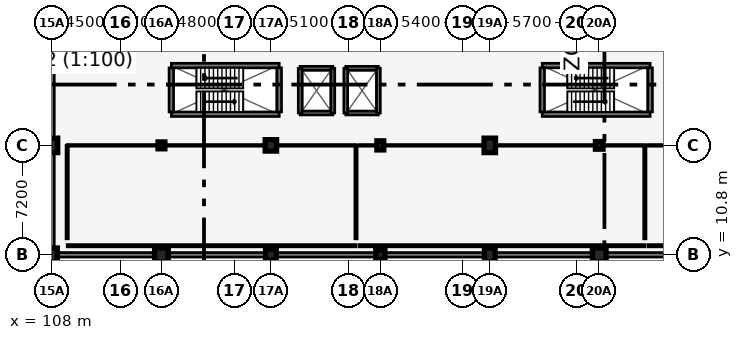
"""IFC4 building model, lengths in metres.
Left out: names, types, materials, properties, quantities, classifications, styles, units other than length and angle.
Written with IfcOpenShell. Run it as: python <this file> out.ifc"""

import sys

from ifc_helpers import new_model, si_unit, direction, frame, frame_2d, origin, origin_2d, place, context, subcontext, project, spatial, rectangle, circle, extrude, element, fill, save


model = new_model("IFC4")
c1 = context("Model", 3, precision=1e-05, world=origin(), true_north=direction((0.0, 1.0)))
c2 = subcontext(c1, "Body", "Model", "MODEL_VIEW")
j1 = project(units=[si_unit("LENGTHUNIT", "METRE"), si_unit("PLANEANGLEUNIT", "RADIAN")], contexts=[c1])
p1 = place(None, origin())
s1 = spatial("IfcSite", under=j1, at=p1, CompositionType="ELEMENT")
p2 = place(p1, origin())
s2 = spatial("IfcBuilding", under=s1, at=p2, CompositionType="ELEMENT")
p3 = place(p2, frame((0.0, 0.0, 4.8)))
s3 = spatial("IfcBuildingStorey", under=s2, at=p3, CompositionType="ELEMENT", Elevation=4.8)
p4 = place(p3, frame((108.0, 10.8, 0.0), z_axis=(0.0, 0.0, 1.0), x_axis=(1.0, 0.0, 0.0)))
e1 = element("IfcColumn", 1, at=p4, inside=s3, PredefinedType="COLUMN", context=c2, shape_type="SweptSolid", body=[
    extrude(rectangle(XDim=0.7, YDim=0.9, at=origin_2d()), origin(), (0.0, 0.0, 1.0), 4.2),
])
p5 = place(p3, frame((108.0, 18.0, 0.0), z_axis=(0.0, 0.0, 1.0), x_axis=(1.0, 0.0, 0.0)))
e2 = element("IfcColumn", 2, at=p5, inside=s3, PredefinedType="COLUMN", context=c2, shape_type="SweptSolid", body=[
    extrude(rectangle(XDim=0.75, YDim=0.95, at=origin_2d()), origin(), (0.0, 0.0, 1.0), 4.2),
])
p6 = place(p3, frame((115.2, 10.8, 0.0), z_axis=(0.0, 0.0, 1.0), x_axis=(1.0, 0.0, 0.0)))
e3 = element("IfcColumn", 3, at=p6, inside=s3, PredefinedType="COLUMN", context=c2, shape_type="SweptSolid", body=[
    extrude(circle(Radius=0.45, at=origin_2d()), origin(), (0.0, 0.0, 1.0), 4.2),
])
p7 = place(p3, frame((115.2, 18.0, 0.0), z_axis=(0.0, 0.0, 1.0), x_axis=(1.0, 0.0, 0.0)))
e4 = element("IfcColumn", 4, at=p7, inside=s3, PredefinedType="COLUMN", context=c2, shape_type="SweptSolid", body=[
    extrude(rectangle(XDim=0.45, YDim=0.45, at=origin_2d()), origin(), (0.0, 0.0, 1.0), 4.2),
])
p8 = place(p3, frame((122.4, 10.8, 0.0), z_axis=(0.0, 0.0, 1.0), x_axis=(1.0, 0.0, 0.0)))
e5 = element("IfcColumn", 5, at=p8, inside=s3, PredefinedType="COLUMN", context=c2, shape_type="SweptSolid", body=[
    extrude(rectangle(XDim=0.7, YDim=0.7, at=origin_2d()), origin(), (0.0, 0.0, 1.0), 4.2),
])
p9 = place(p3, frame((122.4, 18.0, 0.0), z_axis=(0.0, 0.0, 1.0), x_axis=(1.0, 0.0, 0.0)))
e6 = element("IfcColumn", 6, at=p9, inside=s3, PredefinedType="COLUMN", context=c2, shape_type="SweptSolid", body=[
    extrude(rectangle(XDim=0.75, YDim=0.75, at=origin_2d()), origin(), (0.0, 0.0, 1.0), 4.2),
])
p10 = place(p3, frame((129.6, 10.8, 0.0), z_axis=(0.0, 0.0, 1.0), x_axis=(1.0, 0.0, 0.0)))
e7 = element("IfcColumn", 7, at=p10, inside=s3, PredefinedType="COLUMN", context=c2, shape_type="SweptSolid", body=[
    extrude(circle(Radius=0.3, at=origin_2d()), origin(), (0.0, 0.0, 1.0), 4.2),
])
p11 = place(p3, frame((129.6, 18.0, 0.0), z_axis=(0.0, 0.0, 1.0), x_axis=(1.0, 0.0, 0.0)))
e8 = element("IfcColumn", 8, at=p11, inside=s3, PredefinedType="COLUMN", context=c2, shape_type="SweptSolid", body=[
    extrude(rectangle(XDim=0.45, YDim=0.6, at=origin_2d()), origin(), (0.0, 0.0, 1.0), 4.2),
])
p12 = place(p3, frame((136.8, 10.8, 0.0), z_axis=(0.0, 0.0, 1.0), x_axis=(1.0, 0.0, 0.0)))
e9 = element("IfcColumn", 9, at=p12, inside=s3, PredefinedType="COLUMN", context=c2, shape_type="SweptSolid", body=[
    extrude(rectangle(XDim=0.7, YDim=0.9, at=origin_2d()), origin(), (0.0, 0.0, 1.0), 4.2),
])
p13 = place(p3, frame((136.8, 18.0, 0.0), z_axis=(0.0, 0.0, 1.0), x_axis=(1.0, 0.0, 0.0)))
e10 = element("IfcColumn", 10, at=p13, inside=s3, PredefinedType="COLUMN", context=c2, shape_type="SweptSolid", body=[
    extrude(rectangle(XDim=0.75, YDim=0.95, at=origin_2d()), origin(), (0.0, 0.0, 1.0), 4.2),
])
p14 = place(p3, frame((144.0, 10.8, 0.0), z_axis=(0.0, 0.0, 1.0), x_axis=(1.0, 0.0, 0.0)))
e11 = element("IfcColumn", 11, at=p14, inside=s3, PredefinedType="COLUMN", context=c2, shape_type="SweptSolid", body=[
    extrude(rectangle(XDim=0.9, YDim=0.9, at=origin_2d()), origin(), (0.0, 0.0, 1.0), 4.2),
])
p15 = place(p3, frame((144.0, 18.0, 0.0), z_axis=(0.0, 0.0, 1.0), x_axis=(1.0, 0.0, 0.0)))
e12 = element("IfcColumn", 12, at=p15, inside=s3, PredefinedType="COLUMN", context=c2, shape_type="SweptSolid", body=[
    extrude(circle(Radius=0.25, at=origin_2d()), origin(), (0.0, 0.0, 1.0), 4.2),
])
p16 = place(p3, frame((108.0, 10.8, 0.0), z_axis=(0.0, 0.0, 1.0), x_axis=(1.0, 0.0, 0.0)))
e13 = element("IfcWall", 13, at=p16, inside=s3, PredefinedType="SOLIDWALL", context=c2, shape_type="SweptSolid", body=[
    extrude(rectangle(XDim=79.2, YDim=0.3, at=frame_2d((39.6, 0.0))), origin(), (0.0, 0.0, 1.0), 2.872),
])
p17 = place(p3, frame((108.0, 54.0, 0.0), z_axis=(0.0, 0.0, 1.0), x_axis=(0.0, -1.0, 0.0)))
e14 = element("IfcWall", 14, at=p17, inside=s3, PredefinedType="SOLIDWALL", context=c2, shape_type="SweptSolid", body=[
    extrude(rectangle(XDim=43.2, YDim=0.3, at=frame_2d((21.6, 0.0))), origin(), (0.0, 0.0, 1.0), 3.5),
])
p18 = place(p17, frame((2.2, 0.0, 0.72)))
e15 = element("IfcOpeningElement", 15, at=p18, cuts=e14, PredefinedType="OPENING", context=c2, shape_type="SweptSolid", body=[
    extrude(rectangle(XDim=1.8, YDim=2.15, at=frame_2d((0.9, 1.075))), frame((0.0, 0.16, 0.0), z_axis=(0.0, -1.0, 0.0), x_axis=(1.0, 0.0, 0.0)), (0.0, 0.0, 1.0), 0.32),
])
p19 = place(p17, frame((16.6, 0.0, 0.72)))
e16 = element("IfcOpeningElement", 16, at=p19, cuts=e14, PredefinedType="OPENING", context=c2, shape_type="SweptSolid", body=[
    extrude(rectangle(XDim=1.35, YDim=2.05, at=frame_2d((0.675, 1.025))), frame((0.0, 0.16, 0.0), z_axis=(0.0, -1.0, 0.0), x_axis=(1.0, 0.0, 0.0)), (0.0, 0.0, 1.0), 0.32),
])
p20 = place(p17, frame((23.8, 0.0, 0.72)))
e17 = element("IfcOpeningElement", 17, at=p20, cuts=e14, PredefinedType="OPENING", context=c2, shape_type="SweptSolid", body=[
    extrude(rectangle(XDim=1.5, YDim=2.1, at=frame_2d((0.75, 1.05))), frame((0.0, 0.16, 0.0), z_axis=(0.0, -1.0, 0.0), x_axis=(1.0, 0.0, 0.0)), (0.0, 0.0, 1.0), 0.32),
])
p21 = place(p17, frame((31.0, 0.0, 0.72)))
e18 = element("IfcOpeningElement", 18, at=p21, cuts=e14, PredefinedType="OPENING", context=c2, shape_type="SweptSolid", body=[
    extrude(rectangle(XDim=1.65, YDim=2.1, at=frame_2d((0.825, 1.05))), frame((0.0, 0.16, 0.0), z_axis=(0.0, -1.0, 0.0), x_axis=(1.0, 0.0, 0.0)), (0.0, 0.0, 1.0), 0.32),
])
p22 = place(p3, frame((115.85, 20.05, 0.0), z_axis=(0.0, 0.0, 1.0), x_axis=(1.0, 0.0, 0.0)))
e19 = element("IfcWall", 19, at=p22, inside=s3, PredefinedType="SHEAR", context=c2, shape_type="SweptSolid", body=[
    extrude(rectangle(XDim=7.1, YDim=0.3, at=frame_2d((3.55, 0.0))), origin(), (0.0, 0.0, 1.0), 3.84),
])
p23 = place(p22, frame((0.35, 0.0, 0.0)))
e20 = element("IfcOpeningElement", 20, at=p23, cuts=e19, PredefinedType="OPENING", context=c2, shape_type="SweptSolid", body=[
    extrude(rectangle(XDim=1.07, YDim=2.15, at=frame_2d((0.535, 1.075))), frame((0.0, 0.16, 0.0), z_axis=(0.0, -1.0, 0.0), x_axis=(1.0, 0.0, 0.0)), (0.0, 0.0, 1.0), 0.32),
])
p24 = place(p3, frame((122.95, 23.25, 0.0), z_axis=(0.0, 0.0, 1.0), x_axis=(-1.0, 0.0, 0.0)))
e21 = element("IfcWall", 21, at=p24, inside=s3, PredefinedType="SHEAR", context=c2, shape_type="SweptSolid", body=[
    extrude(rectangle(XDim=7.1, YDim=0.3, at=frame_2d((3.55, 0.0))), origin(), (0.0, 0.0, 1.0), 3.84),
])
for number, where, z_axis, x_axis in (
    (22, (122.95, 20.2, 0.0), (0.0, 0.0, 1.0), (0.0, 1.0, 0.0)),
    (23, (115.85, 23.1, 0.0), (0.0, 0.0, 1.0), (0.0, -1.0, 0.0)),
):
    element("IfcWall", number, at=place(p3, frame(where, z_axis=z_axis, x_axis=x_axis)), inside=s3, PredefinedType="SHEAR", context=c2, shape_type="SweptSolid", body=[
        extrude(rectangle(XDim=2.9, YDim=0.3, at=frame_2d((1.45, 0.0))), origin(), (0.0, 0.0, 1.0), 3.84),
    ])
p25 = place(p3, frame((140.25, 20.05, 0.0), z_axis=(0.0, 0.0, 1.0), x_axis=(1.0, 0.0, 0.0)))
e24 = element("IfcWall", 24, at=p25, inside=s3, PredefinedType="SHEAR", context=c2, shape_type="SweptSolid", body=[
    extrude(rectangle(XDim=7.1, YDim=0.3, at=frame_2d((3.55, 0.0))), origin(), (0.0, 0.0, 1.0), 3.84),
])
p26 = place(p25, frame((0.35, 0.0, 0.0)))
e25 = element("IfcOpeningElement", 25, at=p26, cuts=e24, PredefinedType="OPENING", context=c2, shape_type="SweptSolid", body=[
    extrude(rectangle(XDim=1.07, YDim=2.15, at=frame_2d((0.535, 1.075))), frame((0.0, 0.16, 0.0), z_axis=(0.0, -1.0, 0.0), x_axis=(1.0, 0.0, 0.0)), (0.0, 0.0, 1.0), 0.32),
])
p27 = place(p3, frame((147.35, 23.25, 0.0), z_axis=(0.0, 0.0, 1.0), x_axis=(-1.0, 0.0, 0.0)))
e26 = element("IfcWall", 26, at=p27, inside=s3, PredefinedType="SHEAR", context=c2, shape_type="SweptSolid", body=[
    extrude(rectangle(XDim=7.1, YDim=0.3, at=frame_2d((3.55, 0.0))), origin(), (0.0, 0.0, 1.0), 3.84),
])
for number, where, z_axis, x_axis in (
    (27, (147.35, 20.2, 0.0), (0.0, 0.0, 1.0), (0.0, 1.0, 0.0)),
    (28, (140.25, 23.1, 0.0), (0.0, 0.0, 1.0), (0.0, -1.0, 0.0)),
):
    element("IfcWall", number, at=place(p3, frame(where, z_axis=z_axis, x_axis=x_axis)), inside=s3, PredefinedType="SHEAR", context=c2, shape_type="SweptSolid", body=[
        extrude(rectangle(XDim=2.9, YDim=0.3, at=frame_2d((1.45, 0.0))), origin(), (0.0, 0.0, 1.0), 3.84),
    ])
p28 = place(p3, frame((124.325, 20.125, 0.0), z_axis=(0.0, 0.0, 1.0), x_axis=(1.0, 0.0, 0.0)))
e29 = element("IfcWall", 29, at=p28, inside=s3, PredefinedType="SHEAR", context=c2, shape_type="SweptSolid", body=[
    extrude(rectangle(XDim=2.15, YDim=0.25, at=frame_2d((1.075, 0.0))), origin(), (0.0, 0.0, 1.0), 3.9),
])
p29 = place(p3, frame((126.475, 23.075, 0.0), z_axis=(0.0, 0.0, 1.0), x_axis=(-1.0, 0.0, 0.0)))
e30 = element("IfcWall", 30, at=p29, inside=s3, PredefinedType="SHEAR", context=c2, shape_type="SweptSolid", body=[
    extrude(rectangle(XDim=2.15, YDim=0.25, at=frame_2d((1.075, 0.0))), origin(), (0.0, 0.0, 1.0), 3.9),
])
p30 = place(p29, frame((0.525, 0.0, 0.0)))
e31 = element("IfcOpeningElement", 31, at=p30, cuts=e30, PredefinedType="OPENING", context=c2, shape_type="SweptSolid", body=[
    extrude(rectangle(XDim=1.1, YDim=2.15, at=frame_2d((0.55, 1.075))), frame((0.0, 0.135, 0.0), z_axis=(0.0, -1.0, 0.0), x_axis=(1.0, 0.0, 0.0)), (0.0, 0.0, 1.0), 0.27),
])
for number, where, z_axis, x_axis in (
    (32, (124.325, 23.075, 0.0), (0.0, 0.0, 1.0), (0.0, -1.0, 0.0)),
    (33, (126.475, 20.125, 0.0), (0.0, 0.0, 1.0), (0.0, 1.0, 0.0)),
):
    element("IfcWall", number, at=place(p3, frame(where, z_axis=z_axis, x_axis=x_axis)), inside=s3, PredefinedType="SHEAR", context=c2, shape_type="SweptSolid", body=[
        extrude(rectangle(XDim=2.95, YDim=0.25, at=frame_2d((1.475, 0.0))), origin(), (0.0, 0.0, 1.0), 3.9),
    ])
p31 = place(p3, frame((127.325, 20.125, 0.0), z_axis=(0.0, 0.0, 1.0), x_axis=(1.0, 0.0, 0.0)))
e34 = element("IfcWall", 34, at=p31, inside=s3, PredefinedType="SHEAR", context=c2, shape_type="SweptSolid", body=[
    extrude(rectangle(XDim=2.15, YDim=0.25, at=frame_2d((1.075, 0.0))), origin(), (0.0, 0.0, 1.0), 3.9),
])
p32 = place(p3, frame((129.475, 23.075, 0.0), z_axis=(0.0, 0.0, 1.0), x_axis=(-1.0, 0.0, 0.0)))
e35 = element("IfcWall", 35, at=p32, inside=s3, PredefinedType="SHEAR", context=c2, shape_type="SweptSolid", body=[
    extrude(rectangle(XDim=2.15, YDim=0.25, at=frame_2d((1.075, 0.0))), origin(), (0.0, 0.0, 1.0), 3.9),
])
p33 = place(p32, frame((0.525, 0.0, 0.0)))
e36 = element("IfcOpeningElement", 36, at=p33, cuts=e35, PredefinedType="OPENING", context=c2, shape_type="SweptSolid", body=[
    extrude(rectangle(XDim=1.1, YDim=2.15, at=frame_2d((0.55, 1.075))), frame((0.0, 0.135, 0.0), z_axis=(0.0, -1.0, 0.0), x_axis=(1.0, 0.0, 0.0)), (0.0, 0.0, 1.0), 0.27),
])
for number, where, z_axis, x_axis in (
    (37, (127.325, 23.075, 0.0), (0.0, 0.0, 1.0), (0.0, -1.0, 0.0)),
    (38, (129.475, 20.125, 0.0), (0.0, 0.0, 1.0), (0.0, 1.0, 0.0)),
):
    element("IfcWall", number, at=place(p3, frame(where, z_axis=z_axis, x_axis=x_axis)), inside=s3, PredefinedType="SHEAR", context=c2, shape_type="SweptSolid", body=[
        extrude(rectangle(XDim=2.95, YDim=0.25, at=frame_2d((1.475, 0.0))), origin(), (0.0, 0.0, 1.0), 3.9),
    ])
p34 = place(p3, frame((128.0, 11.4, 0.0), z_axis=(0.0, 0.0, 1.0), x_axis=(-1.0, 0.0, 0.0)))
e39 = element("IfcWall", 39, at=p34, inside=s3, PredefinedType="PARTITIONING", context=c2, shape_type="SweptSolid", body=[
    extrude(rectangle(XDim=19.0, YDim=0.15, at=frame_2d((9.5, 0.0))), origin(), (0.0, 0.0, 1.0), 3.172),
])
p35 = place(p3, frame((128.0, 11.85, 0.0), z_axis=(0.0, 0.0, 1.0), x_axis=(0.0, 1.0, 0.0)))
e40 = element("IfcWall", 40, at=p35, inside=s3, PredefinedType="PARTITIONING", context=c2, shape_type="SweptSolid", body=[
    extrude(rectangle(XDim=6.15, YDim=0.15, at=frame_2d((3.075, 0.0))), origin(), (0.0, 0.0, 1.0), 2.922),
])
p36 = place(p3, frame((109.0, 18.0, 0.0), z_axis=(0.0, 0.0, 1.0), x_axis=(0.0, -1.0, 0.0)))
e41 = element("IfcWall", 41, at=p36, inside=s3, PredefinedType="PARTITIONING", context=c2, shape_type="SweptSolid", body=[
    extrude(rectangle(XDim=6.15, YDim=0.15, at=frame_2d((3.075, 0.0))), origin(), (0.0, 0.0, 1.0), 3.022),
])
p37 = place(p3, frame((109.0, 18.0, 0.0), z_axis=(0.0, 0.0, 1.0), x_axis=(1.0, 0.0, 0.0)))
e42 = element("IfcWall", 42, at=p37, inside=s3, PredefinedType="PARTITIONING", context=c2, shape_type="SweptSolid", body=[
    extrude(rectangle(XDim=19.0, YDim=0.11, at=frame_2d((9.5, 0.0))), origin(), (0.0, 0.0, 1.0), 2.922),
])
p38 = place(p37, frame((8.98, 0.0, 0.0)))
e43 = element("IfcOpeningElement", 43, at=p38, cuts=e42, PredefinedType="OPENING", context=c2, shape_type="SweptSolid", body=[
    extrude(rectangle(XDim=1.04, YDim=2.15, at=frame_2d((0.52, 1.075))), frame((0.0, 0.065, 0.0), z_axis=(0.0, -1.0, 0.0), x_axis=(1.0, 0.0, 0.0)), (0.0, 0.0, 1.0), 0.13),
])
p39 = place(p3, frame((147.0, 11.4, 0.0), z_axis=(0.0, 0.0, 1.0), x_axis=(-1.0, 0.0, 0.0)))
e44 = element("IfcWall", 44, at=p39, inside=s3, PredefinedType="PARTITIONING", context=c2, shape_type="SweptSolid", body=[
    extrude(rectangle(XDim=18.8, YDim=0.15, at=frame_2d((9.4, 0.0))), origin(), (0.0, 0.0, 1.0), 3.122),
])
p40 = place(p3, frame((147.0, 11.85, 0.0), z_axis=(0.0, 0.0, 1.0), x_axis=(0.0, 1.0, 0.0)))
e45 = element("IfcWall", 45, at=p40, inside=s3, PredefinedType="PARTITIONING", context=c2, shape_type="SweptSolid", body=[
    extrude(rectangle(XDim=6.15, YDim=0.15, at=frame_2d((3.075, 0.0))), origin(), (0.0, 0.0, 1.0), 3.372),
])
p41 = place(p3, frame((128.2, 18.0, 0.0), z_axis=(0.0, 0.0, 1.0), x_axis=(1.0, 0.0, 0.0)))
e46 = element("IfcWall", 46, at=p41, inside=s3, PredefinedType="PARTITIONING", context=c2, shape_type="SweptSolid", body=[
    extrude(rectangle(XDim=18.8, YDim=0.11, at=frame_2d((9.4, 0.0))), origin(), (0.0, 0.0, 1.0), 2.822),
])
p42 = place(p41, frame((5.322, 0.0, 0.0)))
e47 = element("IfcOpeningElement", 47, at=p42, cuts=e46, PredefinedType="OPENING", context=c2, shape_type="SweptSolid", body=[
    extrude(rectangle(XDim=1.06, YDim=2.15, at=frame_2d((0.53, 1.075))), frame((0.0, 0.065, 0.0), z_axis=(0.0, -1.0, 0.0), x_axis=(1.0, 0.0, 0.0)), (0.0, 0.0, 1.0), 0.13),
])
p43 = place(p3, frame((166.8, 11.4, 0.0), z_axis=(0.0, 0.0, 1.0), x_axis=(-1.0, 0.0, 0.0)))
e48 = element("IfcWall", 48, at=p43, inside=s3, PredefinedType="PARTITIONING", context=c2, shape_type="SweptSolid", body=[
    extrude(rectangle(XDim=19.6, YDim=0.15, at=frame_2d((9.8, 0.0))), origin(), (0.0, 0.0, 1.0), 3.072),
])
p44 = place(p3, frame((147.2, 18.0, 0.0), z_axis=(0.0, 0.0, 1.0), x_axis=(1.0, 0.0, 0.0)))
e49 = element("IfcWall", 49, at=p44, inside=s3, PredefinedType="PARTITIONING", context=c2, shape_type="SweptSolid", body=[
    extrude(rectangle(XDim=19.6, YDim=0.11, at=frame_2d((9.8, 0.0))), origin(), (0.0, 0.0, 1.0), 3.222),
])
p45 = place(p44, frame((9.28, 0.0, 0.0)))
e50 = element("IfcOpeningElement", 50, at=p45, cuts=e49, PredefinedType="OPENING", context=c2, shape_type="SweptSolid", body=[
    extrude(rectangle(XDim=1.04, YDim=2.15, at=frame_2d((0.52, 1.075))), frame((0.0, 0.065, 0.0), z_axis=(0.0, -1.0, 0.0), x_axis=(1.0, 0.0, 0.0)), (0.0, 0.0, 1.0), 0.13),
])
p46 = place(p21, origin())
e51 = element("IfcWindow", 51, at=p46, inside=s3, PartitioningType="SINGLE_PANEL", PredefinedType="WINDOW", context=c2, shape_type="SweptSolid", body=[
    extrude(rectangle(XDim=1.65, YDim=2.1, at=frame_2d((0.825, 1.05))), frame((0.0, 0.03, 0.0), z_axis=(0.0, -1.0, 0.0), x_axis=(1.0, 0.0, 0.0)), (0.0, 0.0, 1.0), 0.06),
])
fill(e18, e51)
p47 = place(p23, origin())
e52 = element("IfcDoor", 52, at=p47, inside=s3, OperationType="SINGLE_SWING_RIGHT", PredefinedType="DOOR", context=c2, shape_type="SweptSolid", body=[
    extrude(rectangle(XDim=1.07, YDim=2.15, at=frame_2d((0.535, 1.075))), frame((0.0, 0.025, 0.0), z_axis=(0.0, -1.0, 0.0), x_axis=(1.0, 0.0, 0.0)), (0.0, 0.0, 1.0), 0.05),
])
fill(e20, e52)
p48 = place(p26, origin())
e53 = element("IfcDoor", 53, at=p48, inside=s3, OperationType="SINGLE_SWING_RIGHT", PredefinedType="DOOR", context=c2, shape_type="SweptSolid", body=[
    extrude(rectangle(XDim=1.07, YDim=2.15, at=frame_2d((0.535, 1.075))), frame((0.0, 0.025, 0.0), z_axis=(0.0, -1.0, 0.0), x_axis=(1.0, 0.0, 0.0)), (0.0, 0.0, 1.0), 0.05),
])
fill(e25, e53)
p49 = place(p30, origin())
e54 = element("IfcDoor", 54, at=p49, inside=s3, OperationType="SLIDING_TO_LEFT", PredefinedType="DOOR", context=c2, shape_type="SweptSolid", body=[
    extrude(rectangle(XDim=1.1, YDim=2.15, at=frame_2d((0.55, 1.075))), frame((0.0, 0.025, 0.0), z_axis=(0.0, -1.0, 0.0), x_axis=(1.0, 0.0, 0.0)), (0.0, 0.0, 1.0), 0.05),
])
fill(e31, e54)
p50 = place(p33, origin())
e55 = element("IfcDoor", 55, at=p50, inside=s3, OperationType="SLIDING_TO_LEFT", PredefinedType="DOOR", context=c2, shape_type="SweptSolid", body=[
    extrude(rectangle(XDim=1.1, YDim=2.15, at=frame_2d((0.55, 1.075))), frame((0.0, 0.025, 0.0), z_axis=(0.0, -1.0, 0.0), x_axis=(1.0, 0.0, 0.0)), (0.0, 0.0, 1.0), 0.05),
])
fill(e36, e55)
p51 = place(p38, origin())
e56 = element("IfcDoor", 56, at=p51, inside=s3, OperationType="SINGLE_SWING_LEFT", PredefinedType="DOOR", context=c2, shape_type="SweptSolid", body=[
    extrude(rectangle(XDim=1.04, YDim=2.15, at=frame_2d((0.52, 1.075))), frame((0.0, 0.025, 0.0), z_axis=(0.0, -1.0, 0.0), x_axis=(1.0, 0.0, 0.0)), (0.0, 0.0, 1.0), 0.05),
])
fill(e43, e56)
p52 = place(p42, origin())
e57 = element("IfcDoor", 57, at=p52, inside=s3, OperationType="SINGLE_SWING_RIGHT", PredefinedType="DOOR", context=c2, shape_type="SweptSolid", body=[
    extrude(rectangle(XDim=1.06, YDim=2.15, at=frame_2d((0.53, 1.075))), frame((0.0, 0.025, 0.0), z_axis=(0.0, -1.0, 0.0), x_axis=(1.0, 0.0, 0.0)), (0.0, 0.0, 1.0), 0.05),
])
fill(e47, e57)
save(model, sys.argv[1])
